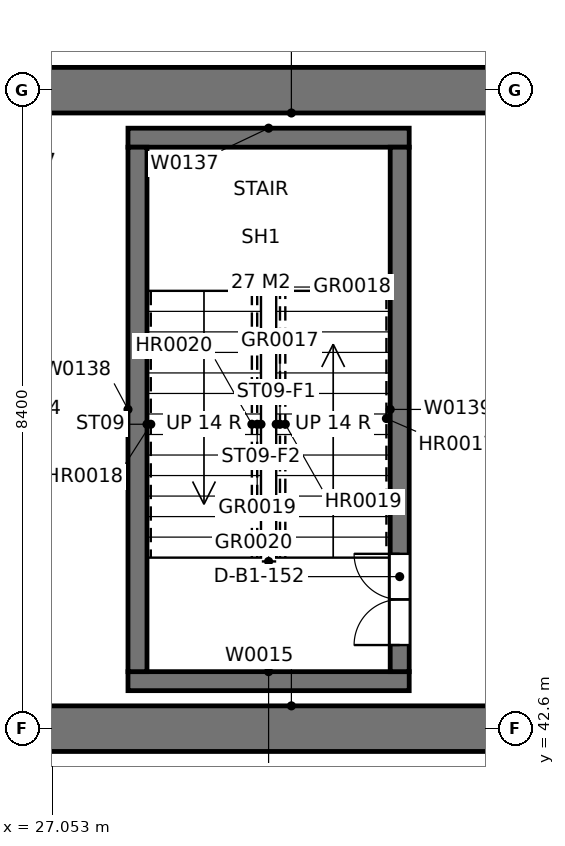
"""IFC4 building model, lengths in metres.
Left out: names, types, materials, properties, quantities, classifications, styles, units other than length and angle.
Written with IfcOpenShell. Run it as: python <this file> out.ifc"""

import sys

from ifc_helpers import new_model, si_unit, direction, frame, frame_2d, origin, place, context, subcontext, project, spatial, rectangle, extrude, element, fill, save


model = new_model("IFC4")
c1 = context("Model", 3, precision=1e-05, world=origin(), true_north=direction((0.0, 1.0)))
c2 = subcontext(c1, "Body", "Model", "MODEL_VIEW")
j1 = project(units=[si_unit("LENGTHUNIT", "METRE"), si_unit("PLANEANGLEUNIT", "RADIAN")], contexts=[c1])
p1 = place(None, origin())
s1 = spatial("IfcSite", under=j1, at=p1, CompositionType="ELEMENT")
p2 = place(p1, origin())
s2 = spatial("IfcBuilding", under=s1, at=p2, CompositionType="ELEMENT")
p3 = place(p2, frame((0.0, 0.0, -5.0)))
s3 = spatial("IfcBuildingStorey", under=s2, at=p3, CompositionType="ELEMENT", Elevation=-5.0)
for number, where, z_axis, x_axis in (
    (1, (33.9, 51.0, 0.0), (0.0, 0.0, 1.0), (-1.0, 0.0, 0.0)),
    (2, (26.5, 42.6, 0.0), (0.0, 0.0, 1.0), (1.0, 0.0, 0.0)),
):
    element("IfcWall", number, at=place(p3, frame(where, z_axis=z_axis, x_axis=x_axis)), inside=s3, PredefinedType="SOLIDWALL", context=c2, shape_type="SweptSolid", body=[
        extrude(rectangle(XDim=7.4, YDim=0.6, at=frame_2d((3.7, 0.0))), origin(), (0.0, 0.0, 1.0), 5.0),
    ])
for number, where, z_axis, x_axis in (
    (3, (28.05, 43.225, 0.0), (0.0, 0.0, 1.0), (1.0, 0.0, 0.0)),
    (4, (28.05, 50.375, 0.0), (0.0, 0.0, 1.0), (1.0, 0.0, 0.0)),
):
    element("IfcWall", number, at=place(p3, frame(where, z_axis=z_axis, x_axis=x_axis)), inside=s3, PredefinedType="SOLIDWALL", context=c2, shape_type="SweptSolid", body=[
        extrude(rectangle(XDim=3.7, YDim=0.25, at=frame_2d((1.85, 0.0))), origin(), (0.0, 0.0, 1.0), 5.0),
    ])
p4 = place(p3, frame((28.175, 43.35, 0.0), z_axis=(0.0, 0.0, 1.0), x_axis=(0.0, 1.0, 0.0)))
e5 = element("IfcWall", 5, at=p4, inside=s3, PredefinedType="SOLIDWALL", context=c2, shape_type="SweptSolid", body=[
    extrude(rectangle(XDim=6.9, YDim=0.25, at=frame_2d((3.45, 0.0))), origin(), (0.0, 0.0, 1.0), 5.0),
])
p5 = place(p3, frame((31.625, 43.35, 0.0), z_axis=(0.0, 0.0, 1.0), x_axis=(0.0, 1.0, 0.0)))
e6 = element("IfcWall", 6, at=p5, inside=s3, PredefinedType="SOLIDWALL", context=c2, shape_type="SweptSolid", body=[
    extrude(rectangle(XDim=6.9, YDim=0.25, at=frame_2d((3.45, 0.0))), origin(), (0.0, 0.0, 1.0), 5.0),
])
p6 = place(p5, frame((0.35, 0.0, 0.0)))
e7 = element("IfcOpeningElement", 7, at=p6, cuts=e6, PredefinedType="OPENING", context=c2, shape_type="SweptSolid", body=[
    extrude(rectangle(XDim=1.2, YDim=2.1, at=frame_2d((0.6, 1.05))), frame((0.0, 0.135, 0.0), z_axis=(0.0, -1.0, 0.0), x_axis=(1.0, 0.0, 0.0)), (0.0, 0.0, 1.0), 0.27),
])
p7 = place(p6, origin())
e8 = element("IfcDoor", 8, at=p7, inside=s3, OperationType="DOUBLE_DOOR_SINGLE_SWING", PredefinedType="DOOR", context=c2, shape_type="SweptSolid", body=[
    extrude(rectangle(XDim=1.2, YDim=2.1, at=frame_2d((0.6, 1.05))), frame((0.0, 0.025, 0.0), z_axis=(0.0, -1.0, 0.0), x_axis=(1.0, 0.0, 0.0)), (0.0, 0.0, 1.0), 0.05),
])
fill(e7, e8)
save(model, sys.argv[1])
